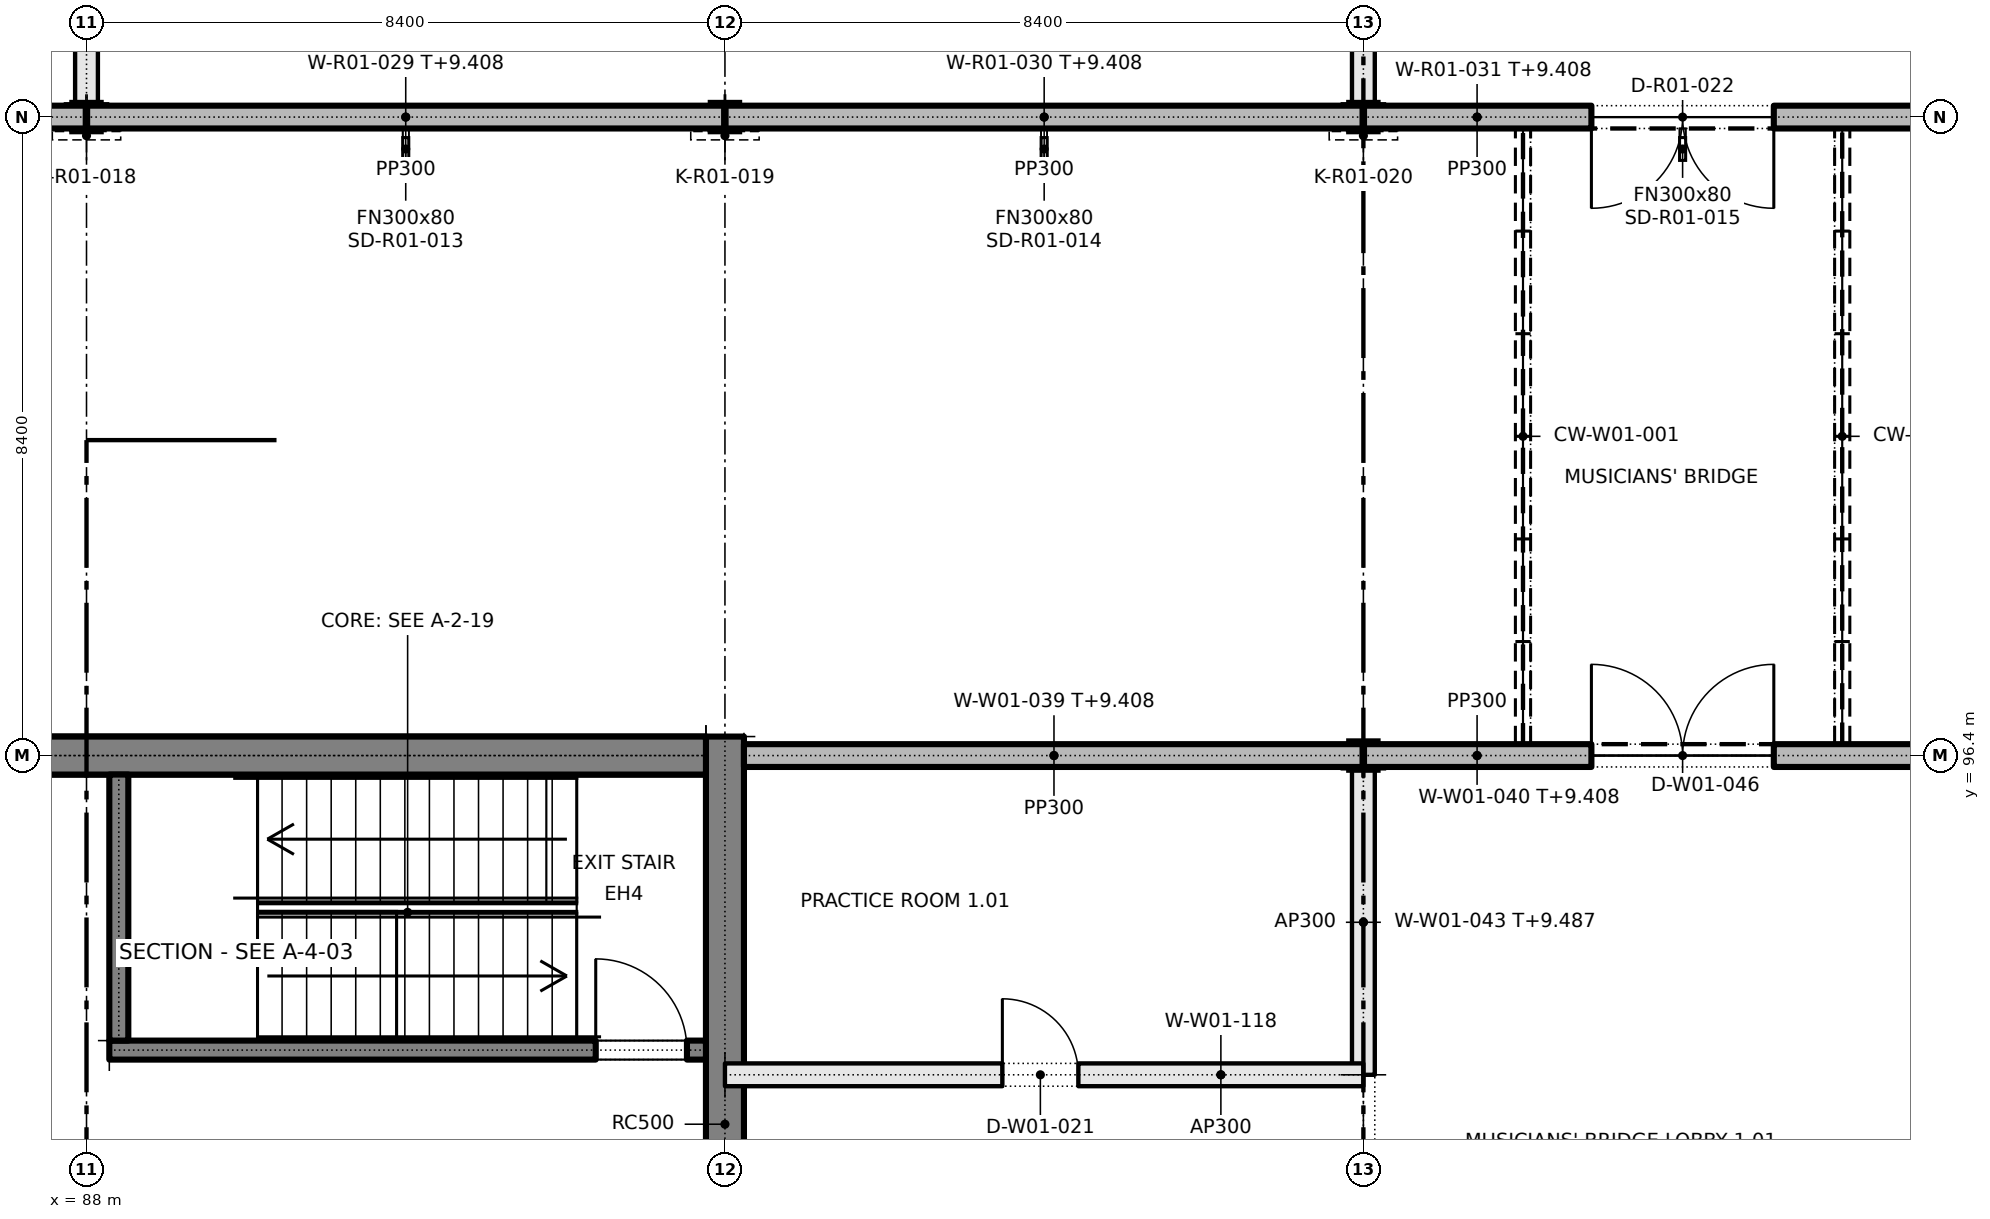
"""IFC4 building model, lengths in metres.
Left out: names, types, materials, properties, quantities, classifications, styles, units other than length and angle.
Written with IfcOpenShell. Run it as: python <this file> out.ifc"""

import sys

from ifc_helpers import new_model, si_unit, direction, frame, frame_2d, origin, origin_2d, place, context, subcontext, project, spatial, rectangle, i_section, extrude, element, fill, save


model = new_model("IFC4")
c1 = context("Model", 3, precision=1e-05, world=origin(), true_north=direction((0.0, 1.0)))
c2 = subcontext(c1, "Body", "Model", "MODEL_VIEW")
j1 = project(units=[si_unit("LENGTHUNIT", "METRE"), si_unit("PLANEANGLEUNIT", "RADIAN")], contexts=[c1])
p1 = place(None, origin())
s1 = spatial("IfcSite", under=j1, at=p1, CompositionType="ELEMENT")
p2 = place(p1, origin())
s2 = spatial("IfcBuilding", under=s1, at=p2, CompositionType="ELEMENT")
p3 = place(p2, frame((0.0, 0.0, 5.4)))
s3 = spatial("IfcBuildingStorey", under=s2, at=p3, CompositionType="ELEMENT", Elevation=5.4)
p4 = place(p3, frame((96.4, 54.15, 0.0), z_axis=(0.0, 0.0, 1.0), x_axis=(0.0, 1.0, 0.0)))
e1 = element("IfcWall", 1, at=p4, inside=s3, PredefinedType="SOLIDWALL", context=c2, shape_type="SweptSolid", body=[
    extrude(rectangle(XDim=42.5, YDim=0.5, at=frame_2d((21.25, 0.0))), origin(), (0.0, 0.0, 1.0), 4.8),
])
p5 = place(p4, frame((8.35, 0.0, 0.0)))
e2 = element("IfcOpeningElement", 2, at=p5, cuts=e1, PredefinedType="OPENING", context=c2, shape_type="SweptSolid", body=[
    extrude(rectangle(XDim=1.8, YDim=2.1, at=frame_2d((0.9, 1.05))), frame((0.0, 0.26, 0.0), z_axis=(0.0, -1.0, 0.0), x_axis=(1.0, 0.0, 0.0)), (0.0, 0.0, 1.0), 0.52),
])
p6 = place(p4, frame((32.35, 0.0, 0.0)))
e3 = element("IfcOpeningElement", 3, at=p6, cuts=e1, PredefinedType="OPENING", context=c2, shape_type="SweptSolid", body=[
    extrude(rectangle(XDim=1.8, YDim=2.1, at=frame_2d((0.9, 1.05))), frame((0.0, 0.26, 0.0), z_axis=(0.0, -1.0, 0.0), x_axis=(1.0, 0.0, 0.0)), (0.0, 0.0, 1.0), 0.52),
])
p7 = place(p3, frame((85.9, 96.4, 0.0), z_axis=(0.0, 0.0, 1.0), x_axis=(1.0, 0.0, 0.0)))
e4 = element("IfcWall", 4, at=p7, inside=s3, PredefinedType="SOLIDWALL", context=c2, shape_type="SweptSolid", body=[
    extrude(rectangle(XDim=10.25, YDim=0.5, at=frame_2d((5.125, 0.0))), origin(), (0.0, 0.0, 1.0), 3.5),
])
p8 = place(p3, frame((29.45, 96.4, 3.5), z_axis=(0.0, 0.0, 1.0), x_axis=(1.0, 0.0, 0.0)))
e5 = element("IfcWall", 5, at=p8, inside=s3, PredefinedType="SOLIDWALL", context=c2, shape_type="SweptSolid", body=[
    extrude(rectangle(XDim=66.7, YDim=0.5, at=frame_2d((33.35, 0.0))), origin(), (0.0, 0.0, 1.0), 1.3),
])
p9 = place(p3, frame((88.3, 92.525, 0.0), z_axis=(0.0, 0.0, 1.0), x_axis=(1.0, 0.0, 0.0)))
e6 = element("IfcWall", 6, at=p9, inside=s3, PredefinedType="SOLIDWALL", context=c2, shape_type="SweptSolid", body=[
    extrude(rectangle(XDim=7.85, YDim=0.25, at=frame_2d((3.925, 0.0))), origin(), (0.0, 0.0, 1.0), 4.8),
])
p10 = place(p9, frame((6.4, 0.0, 0.0)))
e7 = element("IfcOpeningElement", 7, at=p10, cuts=e6, PredefinedType="OPENING", context=c2, shape_type="SweptSolid", body=[
    extrude(rectangle(XDim=1.2, YDim=2.1, at=frame_2d((0.6, 1.05))), frame((0.0, 0.135, 0.0), z_axis=(0.0, -1.0, 0.0), x_axis=(1.0, 0.0, 0.0)), (0.0, 0.0, 1.0), 0.27),
])
p11 = place(p3, frame((88.425, 92.65, 0.0), z_axis=(0.0, 0.0, 1.0), x_axis=(0.0, 1.0, 0.0)))
e8 = element("IfcWall", 8, at=p11, inside=s3, PredefinedType="SOLIDWALL", context=c2, shape_type="SweptSolid", body=[
    extrude(rectangle(XDim=3.5, YDim=0.25, at=frame_2d((1.75, 0.0))), origin(), (0.0, 0.0, 1.0), 4.8),
])
for number, where, z_axis, x_axis in (
    (9, (104.8, 96.4, 0.0), (0.0, 0.0, 1.0), (1.0, 0.0, 0.0)),
    (10, (88.0, 104.8, 0.0), (0.0, 0.0, 1.0), (1.0, 0.0, 0.0)),
    (11, (96.4, 104.8, 0.0), (0.0, 0.0, 1.0), (1.0, 0.0, 0.0)),
    (12, (104.8, 104.8, 0.0), (0.0, 0.0, 1.0), (1.0, 0.0, 0.0)),
):
    element("IfcColumn", number, at=place(p3, frame(where, z_axis=z_axis, x_axis=x_axis)), inside=s3, PredefinedType="COLUMN", context=c2, shape_type="SweptSolid", body=[
        extrude(i_section(OverallWidth=0.373, OverallDepth=0.373, WebThickness=0.016, FlangeThickness=0.026, FilletRadius=0.015, at=origin_2d()), origin(), (0.0, 0.0, 1.0), 4.8),
    ])
p12 = place(p3, frame((96.65, 96.4, 0.0), z_axis=(0.0, 0.0, 1.0), x_axis=(1.0, 0.0, 0.0)))
e13 = element("IfcWall", 13, at=p12, inside=s3, PredefinedType="SOLIDWALL", context=c2, shape_type="SweptSolid", body=[
    extrude(rectangle(XDim=8.158, YDim=0.3, at=frame_2d((4.079, 0.0))), origin(), (0.0, 0.0, 1.0), 4.008),
])
p13 = place(p3, frame((104.792, 96.4, 0.0), z_axis=(0.0, 0.0, 1.0), x_axis=(1.0, 0.0, 0.0)))
e14 = element("IfcWall", 14, at=p13, inside=s3, PredefinedType="SOLIDWALL", context=c2, shape_type="SweptSolid", body=[
    extrude(rectangle(XDim=8.4, YDim=0.3, at=frame_2d((4.2, 0.0))), origin(), (0.0, 0.0, 1.0), 4.008),
])
p14 = place(p13, frame((3.008, 0.0, 0.0)))
e15 = element("IfcOpeningElement", 15, at=p14, cuts=e14, PredefinedType="OPENING", context=c2, shape_type="SweptSolid", body=[
    extrude(rectangle(XDim=2.4, YDim=2.4, at=frame_2d((1.2, 1.2))), frame((0.0, 0.16, 0.0), z_axis=(0.0, -1.0, 0.0), x_axis=(1.0, 0.0, 0.0)), (0.0, 0.0, 1.0), 0.32),
])
for number, where, z_axis, x_axis in (
    (16, (79.592, 104.8, 0.0), (0.0, 0.0, 1.0), (1.0, 0.0, 0.0)),
    (17, (87.992, 104.8, 0.0), (0.0, 0.0, 1.0), (1.0, 0.0, 0.0)),
):
    element("IfcWall", number, at=place(p3, frame(where, z_axis=z_axis, x_axis=x_axis)), inside=s3, PredefinedType="SOLIDWALL", context=c2, shape_type="SweptSolid", body=[
        extrude(rectangle(XDim=8.417, YDim=0.3, at=frame_2d((4.208, 0.0))), origin(), (0.0, 0.0, 1.0), 4.008),
    ])
p15 = place(p3, frame((96.392, 104.8, 0.0), z_axis=(0.0, 0.0, 1.0), x_axis=(1.0, 0.0, 0.0)))
e18 = element("IfcWall", 18, at=p15, inside=s3, PredefinedType="SOLIDWALL", context=c2, shape_type="SweptSolid", body=[
    extrude(rectangle(XDim=8.416, YDim=0.3, at=frame_2d((4.208, 0.0))), origin(), (0.0, 0.0, 1.0), 4.008),
])
p16 = place(p3, frame((104.792, 104.8, 0.0), z_axis=(0.0, 0.0, 1.0), x_axis=(1.0, 0.0, 0.0)))
e19 = element("IfcWall", 19, at=p16, inside=s3, PredefinedType="SOLIDWALL", context=c2, shape_type="SweptSolid", body=[
    extrude(rectangle(XDim=8.417, YDim=0.3, at=frame_2d((4.208, 0.0))), origin(), (0.0, 0.0, 1.0), 4.008),
])
p17 = place(p16, frame((3.008, 0.0, 0.0)))
e20 = element("IfcOpeningElement", 20, at=p17, cuts=e19, PredefinedType="OPENING", context=c2, shape_type="SweptSolid", body=[
    extrude(rectangle(XDim=2.4, YDim=2.4, at=frame_2d((1.2, 1.2))), frame((0.0, 0.16, 0.0), z_axis=(0.0, -1.0, 0.0), x_axis=(1.0, 0.0, 0.0)), (0.0, 0.0, 1.0), 0.32),
])
p18 = place(p3, frame((104.8, 92.2, 0.0), z_axis=(0.0, 0.0, 1.0), x_axis=(0.0, 1.0, 0.0)))
e21 = element("IfcWall", 21, at=p18, inside=s3, PredefinedType="PARTITIONING", context=c2, shape_type="SweptSolid", body=[
    extrude(rectangle(XDim=4.013, YDim=0.3, at=frame_2d((2.007, 0.0))), origin(), (0.0, 0.0, 1.0), 4.087),
])
p19 = place(p3, frame((96.4, 92.2, 0.0), z_axis=(0.0, 0.0, 1.0), x_axis=(1.0, 0.0, 0.0)))
e22 = element("IfcWall", 22, at=p19, inside=s3, PredefinedType="PARTITIONING", context=c2, shape_type="SweptSolid", body=[
    extrude(rectangle(XDim=8.4, YDim=0.3, at=frame_2d((4.2, 0.0))), origin(), (0.0, 0.0, 1.0), 4.8),
])
p20 = place(p19, frame((3.65, 0.0, 0.0)))
e23 = element("IfcOpeningElement", 23, at=p20, cuts=e22, PredefinedType="OPENING", context=c2, shape_type="SweptSolid", body=[
    extrude(rectangle(XDim=1.0, YDim=2.1, at=frame_2d((0.5, 1.05))), frame((0.0, 0.16, 0.0), z_axis=(0.0, -1.0, 0.0), x_axis=(1.0, 0.0, 0.0)), (0.0, 0.0, 1.0), 0.32),
])
for number, where, z_axis, x_axis in (
    (24, (88.0, 104.987, 0.0), (0.0, 0.0, 1.0), (0.0, 1.0, 0.0)),
    (25, (104.8, 104.987, 0.0), (0.0, 0.0, 1.0), (0.0, 1.0, 0.0)),
):
    element("IfcWall", number, at=place(p3, frame(where, z_axis=z_axis, x_axis=x_axis)), inside=s3, PredefinedType="PARTITIONING", context=c2, shape_type="SweptSolid", body=[
        extrude(rectangle(XDim=8.027, YDim=0.3, at=frame_2d((4.013, 0.0))), origin(), (0.0, 0.0, 1.0), 4.087),
    ])
p21 = place(p10, origin())
e26 = element("IfcDoor", 26, at=p21, inside=s3, OperationType="SINGLE_SWING_LEFT", PredefinedType="DOOR", context=c2, shape_type="SweptSolid", body=[
    extrude(rectangle(XDim=1.2, YDim=2.1, at=frame_2d((0.6, 1.05))), frame((0.0, 0.025, 0.0), z_axis=(0.0, -1.0, 0.0), x_axis=(1.0, 0.0, 0.0)), (0.0, 0.0, 1.0), 0.05),
])
fill(e7, e26)
p22 = place(p20, origin())
e27 = element("IfcDoor", 27, at=p22, inside=s3, OperationType="SINGLE_SWING_LEFT", PredefinedType="DOOR", context=c2, shape_type="SweptSolid", body=[
    extrude(rectangle(XDim=1.0, YDim=2.1, at=frame_2d((0.5, 1.05))), frame((0.0, 0.025, 0.0), z_axis=(0.0, -1.0, 0.0), x_axis=(1.0, 0.0, 0.0)), (0.0, 0.0, 1.0), 0.05),
])
fill(e23, e27)
p23 = place(p14, origin())
e28 = element("IfcDoor", 28, at=p23, inside=s3, OperationType="DOUBLE_DOOR_SINGLE_SWING", PredefinedType="DOOR", context=c2, shape_type="SweptSolid", body=[
    extrude(rectangle(XDim=2.4, YDim=2.4, at=frame_2d((1.2, 1.2))), frame((0.0, 0.025, 0.0), z_axis=(0.0, -1.0, 0.0), x_axis=(1.0, 0.0, 0.0)), (0.0, 0.0, 1.0), 0.05),
])
fill(e15, e28)
p24 = place(p17, frame((2.4, 0.0, 0.0), z_axis=(0.0, 0.0, 1.0), x_axis=(-1.0, 0.0, 0.0)))
e29 = element("IfcDoor", 29, at=p24, inside=s3, OperationType="DOUBLE_DOOR_SINGLE_SWING", PredefinedType="DOOR", context=c2, shape_type="SweptSolid", body=[
    extrude(rectangle(XDim=2.4, YDim=2.4, at=frame_2d((1.2, 1.2))), frame((0.0, 0.025, 0.0), z_axis=(0.0, -1.0, 0.0), x_axis=(1.0, 0.0, 0.0)), (0.0, 0.0, 1.0), 0.05),
])
fill(e20, e29)
save(model, sys.argv[1])
